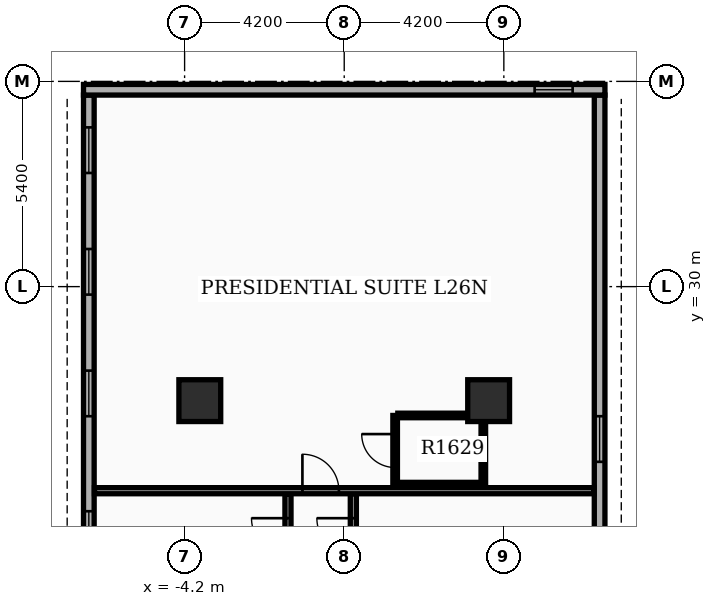
"""IFC4 building model, lengths in metres.
Left out: names, types, materials, properties, quantities, classifications, styles, units other than length and angle.
Written with IfcOpenShell. Run it as: python <this file> out.ifc"""

import sys

from ifc_helpers import new_model, si_unit, direction, frame, frame_2d, origin, origin_2d, place, context, subcontext, project, spatial, rectangle, extrude, element, fill, save


model = new_model("IFC4")
c1 = context("Model", 3, precision=1e-05, world=origin(), true_north=direction((0.0, 1.0)))
c2 = subcontext(c1, "Body", "Model", "MODEL_VIEW")
j1 = project(units=[si_unit("LENGTHUNIT", "METRE"), si_unit("PLANEANGLEUNIT", "RADIAN")], contexts=[c1])
p1 = place(None, origin())
s1 = spatial("IfcSite", under=j1, at=p1, CompositionType="ELEMENT")
p2 = place(p1, origin())
s2 = spatial("IfcBuilding", under=s1, at=p2, CompositionType="ELEMENT")
p3 = place(p2, frame((0.0, 0.0, 104.7)))
s3 = spatial("IfcBuildingStorey", under=s2, at=p3, CompositionType="ELEMENT", Elevation=104.7)
for number, where, z_axis, x_axis in (
    (1, (-3.8, 27.0, 0.0), (0.0, 0.0, 1.0), (1.0, 0.0, 0.0)),
    (2, (3.8, 27.0, 0.0), (0.0, 0.0, 1.0), (1.0, 0.0, 0.0)),
):
    element("IfcColumn", number, at=place(p3, frame(where, z_axis=z_axis, x_axis=x_axis)), inside=s3, PredefinedType="COLUMN", context=c2, shape_type="SweptSolid", body=[
        extrude(rectangle(XDim=1.1, YDim=1.1, at=origin_2d()), origin(), (0.0, 0.0, 1.0), 3.9),
    ])
p4 = place(p3, frame((6.72, 14.94, 0.0), z_axis=(0.0, 0.0, 1.0), x_axis=(0.0, 1.0, 0.0)))
e3 = element("IfcWall", 3, at=p4, inside=s3, PredefinedType="STANDARD", context=c2, shape_type="SweptSolid", body=[
    extrude(rectangle(XDim=20.1, YDim=0.28, at=frame_2d((10.05, 0.0))), origin(), (0.0, 0.0, 1.0), 2.97),
])
p5 = place(p4, frame((0.85, 0.0, 0.8)))
e4 = element("IfcOpeningElement", 4, at=p5, cuts=e3, PredefinedType="OPENING", context=c2, shape_type="SweptSolid", body=[
    extrude(rectangle(XDim=1.2, YDim=1.6, at=frame_2d((0.6, 0.8))), frame((0.0, 0.15, 0.0), z_axis=(0.0, -1.0, 0.0), x_axis=(1.0, 0.0, 0.0)), (0.0, 0.0, 1.0), 0.3),
])
p6 = place(p4, frame((4.05, 0.0, 0.8)))
e5 = element("IfcOpeningElement", 5, at=p6, cuts=e3, PredefinedType="OPENING", context=c2, shape_type="SweptSolid", body=[
    extrude(rectangle(XDim=1.2, YDim=1.6, at=frame_2d((0.6, 0.8))), frame((0.0, 0.15, 0.0), z_axis=(0.0, -1.0, 0.0), x_axis=(1.0, 0.0, 0.0)), (0.0, 0.0, 1.0), 0.3),
])
p7 = place(p4, frame((7.25, 0.0, 0.8)))
e6 = element("IfcOpeningElement", 6, at=p7, cuts=e3, PredefinedType="OPENING", context=c2, shape_type="SweptSolid", body=[
    extrude(rectangle(XDim=1.2, YDim=1.6, at=frame_2d((0.6, 0.8))), frame((0.0, 0.15, 0.0), z_axis=(0.0, -1.0, 0.0), x_axis=(1.0, 0.0, 0.0)), (0.0, 0.0, 1.0), 0.3),
])
p8 = place(p4, frame((10.45, 0.0, 0.8)))
e7 = element("IfcOpeningElement", 7, at=p8, cuts=e3, PredefinedType="OPENING", context=c2, shape_type="SweptSolid", body=[
    extrude(rectangle(XDim=1.2, YDim=1.6, at=frame_2d((0.6, 0.8))), frame((0.0, 0.15, 0.0), z_axis=(0.0, -1.0, 0.0), x_axis=(1.0, 0.0, 0.0)), (0.0, 0.0, 1.0), 0.3),
])
p9 = place(p3, frame((-6.72, 35.04, 0.0), z_axis=(0.0, 0.0, 1.0), x_axis=(0.0, -1.0, 0.0)))
e8 = element("IfcWall", 8, at=p9, inside=s3, PredefinedType="STANDARD", context=c2, shape_type="SweptSolid", body=[
    extrude(rectangle(XDim=20.1, YDim=0.28, at=frame_2d((10.05, 0.0))), origin(), (0.0, 0.0, 1.0), 2.97),
])
p10 = place(p9, frame((0.85, 0.0, 0.8)))
e9 = element("IfcOpeningElement", 9, at=p10, cuts=e8, PredefinedType="OPENING", context=c2, shape_type="SweptSolid", body=[
    extrude(rectangle(XDim=1.2, YDim=1.6, at=frame_2d((0.6, 0.8))), frame((0.0, 0.15, 0.0), z_axis=(0.0, -1.0, 0.0), x_axis=(1.0, 0.0, 0.0)), (0.0, 0.0, 1.0), 0.3),
])
p11 = place(p9, frame((4.05, 0.0, 0.8)))
e10 = element("IfcOpeningElement", 10, at=p11, cuts=e8, PredefinedType="OPENING", context=c2, shape_type="SweptSolid", body=[
    extrude(rectangle(XDim=1.2, YDim=1.6, at=frame_2d((0.6, 0.8))), frame((0.0, 0.15, 0.0), z_axis=(0.0, -1.0, 0.0), x_axis=(1.0, 0.0, 0.0)), (0.0, 0.0, 1.0), 0.3),
])
p12 = place(p9, frame((7.25, 0.0, 0.8)))
e11 = element("IfcOpeningElement", 11, at=p12, cuts=e8, PredefinedType="OPENING", context=c2, shape_type="SweptSolid", body=[
    extrude(rectangle(XDim=1.2, YDim=1.6, at=frame_2d((0.6, 0.8))), frame((0.0, 0.15, 0.0), z_axis=(0.0, -1.0, 0.0), x_axis=(1.0, 0.0, 0.0)), (0.0, 0.0, 1.0), 0.3),
])
p13 = place(p9, frame((10.95, 0.0, 0.8)))
e12 = element("IfcOpeningElement", 12, at=p13, cuts=e8, PredefinedType="OPENING", context=c2, shape_type="SweptSolid", body=[
    extrude(rectangle(XDim=1.2, YDim=1.6, at=frame_2d((0.6, 0.8))), frame((0.0, 0.15, 0.0), z_axis=(0.0, -1.0, 0.0), x_axis=(1.0, 0.0, 0.0)), (0.0, 0.0, 1.0), 0.3),
])
p14 = place(p9, frame((14.799, 0.0, 0.85)))
e13 = element("IfcOpeningElement", 13, at=p14, cuts=e8, PredefinedType="OPENING", context=c2, shape_type="SweptSolid", body=[
    extrude(rectangle(XDim=1.2, YDim=1.6, at=frame_2d((0.6, 0.8))), frame((0.0, 0.15, 0.0), z_axis=(0.0, -1.0, 0.0), x_axis=(1.0, 0.0, 0.0)), (0.0, 0.0, 1.0), 0.3),
])
p15 = place(p3, frame((6.86, 35.18, 0.0), z_axis=(0.0, 0.0, 1.0), x_axis=(-1.0, 0.0, 0.0)))
e14 = element("IfcWall", 14, at=p15, inside=s3, PredefinedType="STANDARD", context=c2, shape_type="SweptSolid", body=[
    extrude(rectangle(XDim=13.72, YDim=0.28, at=frame_2d((6.86, 0.0))), origin(), (0.0, 0.0, 1.0), 2.97),
])
p16 = place(p15, frame((0.85, 0.0, 0.85)))
e15 = element("IfcOpeningElement", 15, at=p16, cuts=e14, PredefinedType="OPENING", context=c2, shape_type="SweptSolid", body=[
    extrude(rectangle(XDim=1.0, YDim=1.5, at=frame_2d((0.5, 0.75))), frame((0.0, 0.15, 0.0), z_axis=(0.0, -1.0, 0.0), x_axis=(1.0, 0.0, 0.0)), (0.0, 0.0, 1.0), 0.3),
])
p17 = place(p3, frame((0.24, 14.85, 0.0), z_axis=(0.0, 0.0, 1.0), x_axis=(0.0, 1.0, 0.0)))
e16 = element("IfcWall", 16, at=p17, inside=s3, PredefinedType="PARTITIONING", context=c2, shape_type="SweptSolid", body=[
    extrude(rectangle(XDim=9.7, YDim=0.16, at=frame_2d((4.85, 0.0))), origin(), (0.0, 0.0, 1.0), 2.96),
])
p18 = place(p17, frame((2.575, 0.0, 0.0)))
e17 = element("IfcOpeningElement", 17, at=p18, cuts=e16, PredefinedType="OPENING", context=c2, shape_type="SweptSolid", body=[
    extrude(rectangle(XDim=0.96, YDim=2.15, at=frame_2d((0.48, 1.075))), frame((0.0, 0.09, 0.0), z_axis=(0.0, -1.0, 0.0), x_axis=(1.0, 0.0, 0.0)), (0.0, 0.0, 1.0), 0.18),
])
p19 = place(p17, frame((8.097, 0.0, 0.0)))
e18 = element("IfcOpeningElement", 18, at=p19, cuts=e16, PredefinedType="OPENING", context=c2, shape_type="SweptSolid", body=[
    extrude(rectangle(XDim=0.96, YDim=2.15, at=frame_2d((0.48, 1.075))), frame((0.0, 0.09, 0.0), z_axis=(0.0, -1.0, 0.0), x_axis=(1.0, 0.0, 0.0)), (0.0, 0.0, 1.0), 0.18),
])
p20 = place(p3, frame((-1.48, 14.85, 0.0), z_axis=(0.0, 0.0, 1.0), x_axis=(0.0, 1.0, 0.0)))
e19 = element("IfcWall", 19, at=p20, inside=s3, PredefinedType="PARTITIONING", context=c2, shape_type="SweptSolid", body=[
    extrude(rectangle(XDim=9.7, YDim=0.16, at=frame_2d((4.85, 0.0))), origin(), (0.0, 0.0, 1.0), 2.96),
])
p21 = place(p20, frame((2.575, 0.0, 0.0)))
e20 = element("IfcOpeningElement", 20, at=p21, cuts=e19, PredefinedType="OPENING", context=c2, shape_type="SweptSolid", body=[
    extrude(rectangle(XDim=0.96, YDim=2.15, at=frame_2d((0.48, 1.075))), frame((0.0, 0.09, 0.0), z_axis=(0.0, -1.0, 0.0), x_axis=(1.0, 0.0, 0.0)), (0.0, 0.0, 1.0), 0.18),
])
p22 = place(p20, frame((8.097, 0.0, 0.0)))
e21 = element("IfcOpeningElement", 21, at=p22, cuts=e19, PredefinedType="OPENING", context=c2, shape_type="SweptSolid", body=[
    extrude(rectangle(XDim=0.96, YDim=2.15, at=frame_2d((0.48, 1.075))), frame((0.0, 0.09, 0.0), z_axis=(0.0, -1.0, 0.0), x_axis=(1.0, 0.0, 0.0)), (0.0, 0.0, 1.0), 0.18),
])
p23 = place(p3, frame((-6.572, 24.63, 0.0), z_axis=(0.0, 0.0, 1.0), x_axis=(1.0, 0.0, 0.0)))
e22 = element("IfcWall", 22, at=p23, inside=s3, PredefinedType="PARTITIONING", context=c2, shape_type="SweptSolid", body=[
    extrude(rectangle(XDim=13.144, YDim=0.16, at=frame_2d((6.572, 0.0))), origin(), (0.0, 0.0, 1.0), 2.96),
])
p24 = place(p23, frame((5.472, 0.0, 0.0)))
e23 = element("IfcOpeningElement", 23, at=p24, cuts=e22, PredefinedType="OPENING", context=c2, shape_type="SweptSolid", body=[
    extrude(rectangle(XDim=0.96, YDim=2.15, at=frame_2d((0.48, 1.075))), frame((0.0, 0.09, 0.0), z_axis=(0.0, -1.0, 0.0), x_axis=(1.0, 0.0, 0.0)), (0.0, 0.0, 1.0), 0.18),
])
p25 = place(p3, frame((1.34, 24.79, 0.0), z_axis=(0.0, 0.0, 1.0), x_axis=(0.0, 1.0, 0.0)))
e24 = element("IfcWall", 24, at=p25, inside=s3, PredefinedType="PARTITIONING", context=c2, shape_type="SweptSolid", body=[
    extrude(rectangle(XDim=1.82, YDim=0.12, at=frame_2d((0.91, 0.0))), origin(), (0.0, 0.0, 1.0), 2.96),
])
p26 = place(p25, frame((0.45, 0.0, 0.0)))
e25 = element("IfcOpeningElement", 25, at=p26, cuts=e24, PredefinedType="OPENING", context=c2, shape_type="SweptSolid", body=[
    extrude(rectangle(XDim=0.88, YDim=2.1, at=frame_2d((0.44, 1.05))), frame((0.0, 0.07, 0.0), z_axis=(0.0, -1.0, 0.0), x_axis=(1.0, 0.0, 0.0)), (0.0, 0.0, 1.0), 0.14),
])
p27 = place(p3, frame((3.66, 24.79, 0.0), z_axis=(0.0, 0.0, 1.0), x_axis=(0.0, 1.0, 0.0)))
e26 = element("IfcWall", 26, at=p27, inside=s3, PredefinedType="PARTITIONING", context=c2, shape_type="SweptSolid", body=[
    extrude(rectangle(XDim=1.82, YDim=0.12, at=frame_2d((0.91, 0.0))), origin(), (0.0, 0.0, 1.0), 2.96),
])
for number, where, z_axis, x_axis in (
    (27, (1.41, 24.79, 0.0), (0.0, 0.0, 1.0), (1.0, 0.0, 0.0)),
    (28, (1.41, 26.61, 0.0), (0.0, 0.0, 1.0), (1.0, 0.0, 0.0)),
):
    element("IfcWall", number, at=place(p3, frame(where, z_axis=z_axis, x_axis=x_axis)), inside=s3, PredefinedType="PARTITIONING", context=c2, shape_type="SweptSolid", body=[
        extrude(rectangle(XDim=2.18, YDim=0.12, at=frame_2d((1.09, 0.0))), origin(), (0.0, 0.0, 1.0), 2.96),
    ])
p28 = place(p8, origin())
e29 = element("IfcWindow", 29, at=p28, inside=s3, PartitioningType="SINGLE_PANEL", PredefinedType="WINDOW", context=c2, shape_type="SweptSolid", body=[
    extrude(rectangle(XDim=1.2, YDim=1.6, at=frame_2d((0.6, 0.8))), frame((0.0, 0.03, 0.0), z_axis=(0.0, -1.0, 0.0), x_axis=(1.0, 0.0, 0.0)), (0.0, 0.0, 1.0), 0.06),
])
fill(e7, e29)
p29 = place(p10, origin())
e30 = element("IfcWindow", 30, at=p29, inside=s3, PartitioningType="SINGLE_PANEL", PredefinedType="WINDOW", context=c2, shape_type="SweptSolid", body=[
    extrude(rectangle(XDim=1.2, YDim=1.6, at=frame_2d((0.6, 0.8))), frame((0.0, 0.03, 0.0), z_axis=(0.0, -1.0, 0.0), x_axis=(1.0, 0.0, 0.0)), (0.0, 0.0, 1.0), 0.06),
])
fill(e9, e30)
p30 = place(p11, origin())
e31 = element("IfcWindow", 31, at=p30, inside=s3, PartitioningType="SINGLE_PANEL", PredefinedType="WINDOW", context=c2, shape_type="SweptSolid", body=[
    extrude(rectangle(XDim=1.2, YDim=1.6, at=frame_2d((0.6, 0.8))), frame((0.0, 0.03, 0.0), z_axis=(0.0, -1.0, 0.0), x_axis=(1.0, 0.0, 0.0)), (0.0, 0.0, 1.0), 0.06),
])
fill(e10, e31)
p31 = place(p12, origin())
e32 = element("IfcWindow", 32, at=p31, inside=s3, PartitioningType="SINGLE_PANEL", PredefinedType="WINDOW", context=c2, shape_type="SweptSolid", body=[
    extrude(rectangle(XDim=1.2, YDim=1.6, at=frame_2d((0.6, 0.8))), frame((0.0, 0.03, 0.0), z_axis=(0.0, -1.0, 0.0), x_axis=(1.0, 0.0, 0.0)), (0.0, 0.0, 1.0), 0.06),
])
fill(e11, e32)
p32 = place(p13, origin())
e33 = element("IfcWindow", 33, at=p32, inside=s3, PartitioningType="SINGLE_PANEL", PredefinedType="WINDOW", context=c2, shape_type="SweptSolid", body=[
    extrude(rectangle(XDim=1.2, YDim=1.6, at=frame_2d((0.6, 0.8))), frame((0.0, 0.03, 0.0), z_axis=(0.0, -1.0, 0.0), x_axis=(1.0, 0.0, 0.0)), (0.0, 0.0, 1.0), 0.06),
])
fill(e12, e33)
p33 = place(p16, origin())
e34 = element("IfcWindow", 34, at=p33, inside=s3, PartitioningType="SINGLE_PANEL", PredefinedType="WINDOW", context=c2, shape_type="SweptSolid", body=[
    extrude(rectangle(XDim=1.0, YDim=1.5, at=frame_2d((0.5, 0.75))), frame((0.0, 0.03, 0.0), z_axis=(0.0, -1.0, 0.0), x_axis=(1.0, 0.0, 0.0)), (0.0, 0.0, 1.0), 0.06),
])
fill(e15, e34)
p34 = place(p19, origin())
e35 = element("IfcDoor", 35, at=p34, inside=s3, OperationType="SINGLE_SWING_RIGHT", PredefinedType="DOOR", context=c2, shape_type="SweptSolid", body=[
    extrude(rectangle(XDim=0.96, YDim=2.15, at=frame_2d((0.48, 1.075))), frame((0.0, 0.025, 0.0), z_axis=(0.0, -1.0, 0.0), x_axis=(1.0, 0.0, 0.0)), (0.0, 0.0, 1.0), 0.05),
])
fill(e18, e35)
p35 = place(p22, origin())
e36 = element("IfcDoor", 36, at=p35, inside=s3, OperationType="SINGLE_SWING_RIGHT", PredefinedType="DOOR", context=c2, shape_type="SweptSolid", body=[
    extrude(rectangle(XDim=0.96, YDim=2.15, at=frame_2d((0.48, 1.075))), frame((0.0, 0.025, 0.0), z_axis=(0.0, -1.0, 0.0), x_axis=(1.0, 0.0, 0.0)), (0.0, 0.0, 1.0), 0.05),
])
fill(e21, e36)
p36 = place(p24, origin())
e37 = element("IfcDoor", 37, at=p36, inside=s3, OperationType="SINGLE_SWING_LEFT", PredefinedType="DOOR", context=c2, shape_type="SweptSolid", body=[
    extrude(rectangle(XDim=0.96, YDim=2.15, at=frame_2d((0.48, 1.075))), frame((0.0, 0.025, 0.0), z_axis=(0.0, -1.0, 0.0), x_axis=(1.0, 0.0, 0.0)), (0.0, 0.0, 1.0), 0.05),
])
fill(e23, e37)
p37 = place(p26, origin())
e38 = element("IfcDoor", 38, at=p37, inside=s3, OperationType="SINGLE_SWING_RIGHT", PredefinedType="DOOR", context=c2, shape_type="SweptSolid", body=[
    extrude(rectangle(XDim=0.88, YDim=2.1, at=frame_2d((0.44, 1.05))), frame((0.0, 0.025, 0.0), z_axis=(0.0, -1.0, 0.0), x_axis=(1.0, 0.0, 0.0)), (0.0, 0.0, 1.0), 0.05),
])
fill(e25, e38)
save(model, sys.argv[1])
